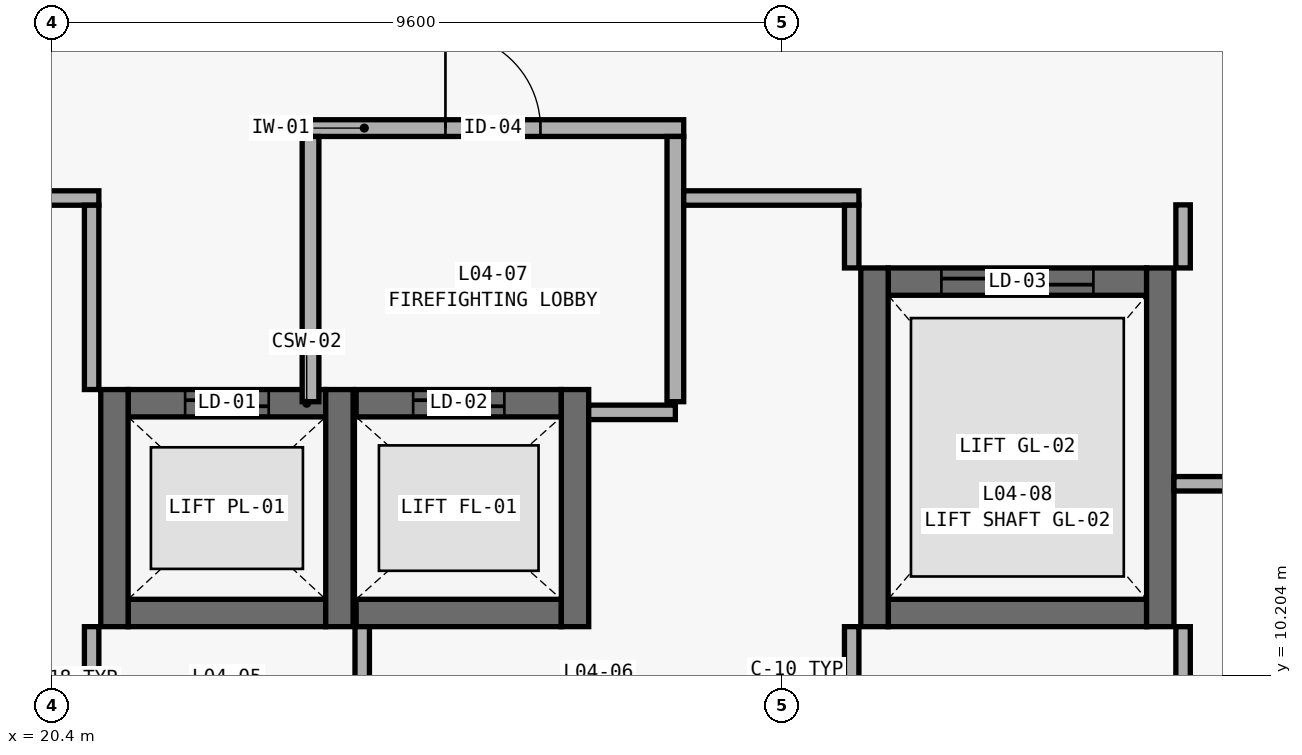
"""IFC4 building model, lengths in metres.
Left out: names, types, materials, properties, quantities, classifications, styles, units other than length and angle.
Written with IfcOpenShell. Run it as: python <this file> out.ifc"""

import sys

from ifc_helpers import new_model, si_unit, direction, frame, frame_2d, origin, place, context, subcontext, project, spatial, rectangle, extrude, element, fill, save


model = new_model("IFC4")
c1 = context("Model", 3, precision=1e-05, world=origin(), true_north=direction((0.0, 1.0)))
c2 = subcontext(c1, "Body", "Model", "MODEL_VIEW")
j1 = project(units=[si_unit("LENGTHUNIT", "METRE"), si_unit("PLANEANGLEUNIT", "RADIAN")], contexts=[c1])
p1 = place(None, origin())
s1 = spatial("IfcSite", under=j1, at=p1, CompositionType="ELEMENT")
p2 = place(p1, origin())
s2 = spatial("IfcBuilding", under=s1, at=p2, CompositionType="ELEMENT")
p3 = place(p2, frame((0.0, 0.0, 21.3)))
s3 = spatial("IfcBuildingStorey", under=s2, at=p3, CompositionType="ELEMENT", Elevation=21.3)
p4 = place(p3, frame((21.4, 13.78, 0.0), z_axis=(0.0, 0.0, 1.0), x_axis=(1.0, 0.0, 0.0)))
e1 = element("IfcWall", 1, at=p4, inside=s3, PredefinedType="SHEAR", context=c2, shape_type="SweptSolid", body=[
    extrude(rectangle(XDim=2.6, YDim=0.36, at=frame_2d((1.3, 0.0))), origin(), (0.0, 0.0, 1.0), 3.95),
])
p5 = place(p4, frame((0.75, 0.0, 0.0)))
e2 = element("IfcOpeningElement", 2, at=p5, cuts=e1, PredefinedType="OPENING", context=c2, shape_type="SweptSolid", body=[
    extrude(rectangle(XDim=1.1, YDim=2.15, at=frame_2d((0.55, 1.075))), frame((0.0, 0.195, 0.0), z_axis=(0.0, -1.0, 0.0), x_axis=(1.0, 0.0, 0.0)), (0.0, 0.0, 1.0), 0.39),
])
p6 = place(p3, frame((21.4, 11.02, 0.0), z_axis=(0.0, 0.0, 1.0), x_axis=(1.0, 0.0, 0.0)))
e3 = element("IfcWall", 3, at=p6, inside=s3, PredefinedType="SHEAR", context=c2, shape_type="SweptSolid", body=[
    extrude(rectangle(XDim=2.6, YDim=0.36, at=frame_2d((1.3, 0.0))), origin(), (0.0, 0.0, 1.0), 3.95),
])
for number, where, z_axis, x_axis in (
    (4, (21.22, 10.84, 0.0), (0.0, 0.0, 1.0), (0.0, 1.0, 0.0)),
    (5, (24.18, 10.84, 0.0), (0.0, 0.0, 1.0), (0.0, 1.0, 0.0)),
):
    element("IfcWall", number, at=place(p3, frame(where, z_axis=z_axis, x_axis=x_axis)), inside=s3, PredefinedType="SHEAR", context=c2, shape_type="SweptSolid", body=[
        extrude(rectangle(XDim=3.12, YDim=0.36, at=frame_2d((1.56, 0.0))), origin(), (0.0, 0.0, 1.0), 3.95),
    ])
p7 = place(p3, frame((24.4, 13.78, 0.0), z_axis=(0.0, 0.0, 1.0), x_axis=(1.0, 0.0, 0.0)))
e6 = element("IfcWall", 6, at=p7, inside=s3, PredefinedType="SHEAR", context=c2, shape_type="SweptSolid", body=[
    extrude(rectangle(XDim=2.7, YDim=0.36, at=frame_2d((1.35, 0.0))), origin(), (0.0, 0.0, 1.0), 3.95),
])
p8 = place(p7, frame((0.75, 0.0, 0.0)))
e7 = element("IfcOpeningElement", 7, at=p8, cuts=e6, PredefinedType="OPENING", context=c2, shape_type="SweptSolid", body=[
    extrude(rectangle(XDim=1.2, YDim=2.15, at=frame_2d((0.6, 1.075))), frame((0.0, 0.195, 0.0), z_axis=(0.0, -1.0, 0.0), x_axis=(1.0, 0.0, 0.0)), (0.0, 0.0, 1.0), 0.39),
])
p9 = place(p3, frame((24.4, 11.02, 0.0), z_axis=(0.0, 0.0, 1.0), x_axis=(1.0, 0.0, 0.0)))
e8 = element("IfcWall", 8, at=p9, inside=s3, PredefinedType="SHEAR", context=c2, shape_type="SweptSolid", body=[
    extrude(rectangle(XDim=2.7, YDim=0.36, at=frame_2d((1.35, 0.0))), origin(), (0.0, 0.0, 1.0), 3.95),
])
p10 = place(p3, frame((27.28, 10.84, 0.0), z_axis=(0.0, 0.0, 1.0), x_axis=(0.0, 1.0, 0.0)))
e9 = element("IfcWall", 9, at=p10, inside=s3, PredefinedType="SHEAR", context=c2, shape_type="SweptSolid", body=[
    extrude(rectangle(XDim=3.12, YDim=0.36, at=frame_2d((1.56, 0.0))), origin(), (0.0, 0.0, 1.0), 3.95),
])
p11 = place(p3, frame((23.69, 17.4, 0.0), z_axis=(0.0, 0.0, 1.0), x_axis=(1.0, 0.0, 0.0)))
e10 = element("IfcWall", 10, at=p11, inside=s3, PredefinedType="PARTITIONING", context=c2, shape_type="SweptSolid", body=[
    extrude(rectangle(XDim=5.02, YDim=0.22, at=frame_2d((2.51, 0.0))), origin(), (0.0, 0.0, 1.0), 2.83),
])
p12 = place(p11, frame((1.885, 0.0, 0.0)))
e11 = element("IfcOpeningElement", 11, at=p12, cuts=e10, PredefinedType="OPENING", context=c2, shape_type="SweptSolid", body=[
    extrude(rectangle(XDim=1.25, YDim=2.15, at=frame_2d((0.625, 1.075))), frame((0.0, 0.125, 0.0), z_axis=(0.0, -1.0, 0.0), x_axis=(1.0, 0.0, 0.0)), (0.0, 0.0, 1.0), 0.25),
])
for number, where, z_axis, x_axis in (
    (12, (23.8, 13.8, 0.0), (0.0, 0.0, 1.0), (0.0, 1.0, 0.0)),
    (13, (28.6, 13.8, 0.0), (0.0, 0.0, 1.0), (0.0, 1.0, 0.0)),
):
    element("IfcWall", number, at=place(p3, frame(where, z_axis=z_axis, x_axis=x_axis)), inside=s3, PredefinedType="PARTITIONING", context=c2, shape_type="SweptSolid", body=[
        extrude(rectangle(XDim=3.49, YDim=0.22, at=frame_2d((1.745, 0.0))), origin(), (0.0, 0.0, 1.0), 2.83),
    ])
p13 = place(p3, frame((31.4, 15.38, 0.0), z_axis=(0.0, 0.0, 1.0), x_axis=(1.0, 0.0, 0.0)))
e14 = element("IfcWall", 14, at=p13, inside=s3, PredefinedType="SHEAR", context=c2, shape_type="SweptSolid", body=[
    extrude(rectangle(XDim=3.4, YDim=0.36, at=frame_2d((1.7, 0.0))), origin(), (0.0, 0.0, 1.0), 3.95),
])
p14 = place(p13, frame((0.7, 0.0, 0.0)))
e15 = element("IfcOpeningElement", 15, at=p14, cuts=e14, PredefinedType="OPENING", context=c2, shape_type="SweptSolid", body=[
    extrude(rectangle(XDim=2.0, YDim=2.4, at=frame_2d((1.0, 1.2))), frame((0.0, 0.195, 0.0), z_axis=(0.0, -1.0, 0.0), x_axis=(1.0, 0.0, 0.0)), (0.0, 0.0, 1.0), 0.39),
])
p15 = place(p3, frame((31.4, 11.02, 0.0), z_axis=(0.0, 0.0, 1.0), x_axis=(1.0, 0.0, 0.0)))
e16 = element("IfcWall", 16, at=p15, inside=s3, PredefinedType="SHEAR", context=c2, shape_type="SweptSolid", body=[
    extrude(rectangle(XDim=3.4, YDim=0.36, at=frame_2d((1.7, 0.0))), origin(), (0.0, 0.0, 1.0), 3.95),
])
for number, where, z_axis, x_axis in (
    (17, (31.22, 10.84, 0.0), (0.0, 0.0, 1.0), (0.0, 1.0, 0.0)),
    (18, (34.98, 10.84, 0.0), (0.0, 0.0, 1.0), (0.0, 1.0, 0.0)),
):
    element("IfcWall", number, at=place(p3, frame(where, z_axis=z_axis, x_axis=x_axis)), inside=s3, PredefinedType="SHEAR", context=c2, shape_type="SweptSolid", body=[
        extrude(rectangle(XDim=4.72, YDim=0.36, at=frame_2d((2.36, 0.0))), origin(), (0.0, 0.0, 1.0), 3.95),
    ])
p16 = place(p3, frame((35.16, 12.72, 0.0), z_axis=(0.0, 0.0, 1.0), x_axis=(1.0, 0.0, 0.0)))
e19 = element("IfcWall", 19, at=p16, inside=s3, PredefinedType="PARTITIONING", context=c2, shape_type="SweptSolid", body=[
    extrude(rectangle(XDim=4.145, YDim=0.19, at=frame_2d((2.073, 0.0))), origin(), (0.0, 0.0, 1.0), 2.83),
])
p17 = place(p3, frame((27.46, 13.66, 0.0), z_axis=(0.0, 0.0, 1.0), x_axis=(1.0, 0.0, 0.0)))
e20 = element("IfcWall", 20, at=p17, inside=s3, PredefinedType="PARTITIONING", context=c2, shape_type="SweptSolid", body=[
    extrude(rectangle(XDim=1.14, YDim=0.19, at=frame_2d((0.57, 0.0))), origin(), (0.0, 0.0, 1.0), 2.83),
])
p18 = place(p3, frame((19.685, 16.48, 0.0), z_axis=(0.0, 0.0, 1.0), x_axis=(1.0, 0.0, 0.0)))
e21 = element("IfcWall", 21, at=p18, inside=s3, PredefinedType="PARTITIONING", context=c2, shape_type="SweptSolid", body=[
    extrude(rectangle(XDim=1.33, YDim=0.19, at=frame_2d((0.665, 0.0))), origin(), (0.0, 0.0, 1.0), 2.83),
])
p19 = place(p3, frame((28.71, 16.48, 0.0), z_axis=(0.0, 0.0, 1.0), x_axis=(1.0, 0.0, 0.0)))
e22 = element("IfcWall", 22, at=p19, inside=s3, PredefinedType="PARTITIONING", context=c2, shape_type="SweptSolid", body=[
    extrude(rectangle(XDim=2.305, YDim=0.19, at=frame_2d((1.152, 0.0))), origin(), (0.0, 0.0, 1.0), 2.83),
])
p20 = place(p3, frame((20.92, 9.015, 0.0), z_axis=(0.0, 0.0, 1.0), x_axis=(0.0, 1.0, 0.0)))
e23 = element("IfcWall", 23, at=p20, inside=s3, PredefinedType="PARTITIONING", context=c2, shape_type="SweptSolid", body=[
    extrude(rectangle(XDim=1.825, YDim=0.19, at=frame_2d((0.913, 0.0))), origin(), (0.0, 0.0, 1.0), 2.83),
])
p21 = place(p3, frame((20.92, 13.96, 0.0), z_axis=(0.0, 0.0, 1.0), x_axis=(0.0, 1.0, 0.0)))
e24 = element("IfcWall", 24, at=p21, inside=s3, PredefinedType="PARTITIONING", context=c2, shape_type="SweptSolid", body=[
    extrude(rectangle(XDim=2.425, YDim=0.19, at=frame_2d((1.212, 0.0))), origin(), (0.0, 0.0, 1.0), 2.83),
])
for number, where, z_axis, x_axis in (
    (25, (24.48, 9.015, 0.0), (0.0, 0.0, 1.0), (0.0, 1.0, 0.0)),
    (26, (30.92, 9.015, 0.0), (0.0, 0.0, 1.0), (0.0, 1.0, 0.0)),
):
    element("IfcWall", number, at=place(p3, frame(where, z_axis=z_axis, x_axis=x_axis)), inside=s3, PredefinedType="PARTITIONING", context=c2, shape_type="SweptSolid", body=[
        extrude(rectangle(XDim=1.825, YDim=0.19, at=frame_2d((0.913, 0.0))), origin(), (0.0, 0.0, 1.0), 2.83),
    ])
p22 = place(p3, frame((30.92, 15.56, 0.0), z_axis=(0.0, 0.0, 1.0), x_axis=(0.0, 1.0, 0.0)))
e27 = element("IfcWall", 27, at=p22, inside=s3, PredefinedType="PARTITIONING", context=c2, shape_type="SweptSolid", body=[
    extrude(rectangle(XDim=0.825, YDim=0.19, at=frame_2d((0.413, 0.0))), origin(), (0.0, 0.0, 1.0), 2.83),
])
p23 = place(p3, frame((35.28, 9.015, 0.0), z_axis=(0.0, 0.0, 1.0), x_axis=(0.0, 1.0, 0.0)))
e28 = element("IfcWall", 28, at=p23, inside=s3, PredefinedType="PARTITIONING", context=c2, shape_type="SweptSolid", body=[
    extrude(rectangle(XDim=1.825, YDim=0.19, at=frame_2d((0.913, 0.0))), origin(), (0.0, 0.0, 1.0), 2.83),
])
p24 = place(p3, frame((35.28, 15.56, 0.0), z_axis=(0.0, 0.0, 1.0), x_axis=(0.0, 1.0, 0.0)))
e29 = element("IfcWall", 29, at=p24, inside=s3, PredefinedType="PARTITIONING", context=c2, shape_type="SweptSolid", body=[
    extrude(rectangle(XDim=0.83, YDim=0.19, at=frame_2d((0.415, 0.0))), origin(), (0.0, 0.0, 1.0), 2.83),
])
p25 = place(p5, origin())
e30 = element("IfcDoor", 30, at=p25, inside=s3, OperationType="DOUBLE_DOOR_SLIDING", PredefinedType="DOOR", context=c2, shape_type="SweptSolid", body=[
    extrude(rectangle(XDim=1.1, YDim=2.15, at=frame_2d((0.55, 1.075))), frame((0.0, 0.025, 0.0), z_axis=(0.0, -1.0, 0.0), x_axis=(1.0, 0.0, 0.0)), (0.0, 0.0, 1.0), 0.05),
])
fill(e2, e30)
p26 = place(p8, origin())
e31 = element("IfcDoor", 31, at=p26, inside=s3, OperationType="DOUBLE_DOOR_SLIDING", PredefinedType="DOOR", context=c2, shape_type="SweptSolid", body=[
    extrude(rectangle(XDim=1.2, YDim=2.15, at=frame_2d((0.6, 1.075))), frame((0.0, 0.025, 0.0), z_axis=(0.0, -1.0, 0.0), x_axis=(1.0, 0.0, 0.0)), (0.0, 0.0, 1.0), 0.05),
])
fill(e7, e31)
p27 = place(p12, origin())
e32 = element("IfcDoor", 32, at=p27, inside=s3, OperationType="SINGLE_SWING_LEFT", PredefinedType="DOOR", context=c2, shape_type="SweptSolid", body=[
    extrude(rectangle(XDim=1.25, YDim=2.15, at=frame_2d((0.625, 1.075))), frame((0.0, 0.025, 0.0), z_axis=(0.0, -1.0, 0.0), x_axis=(1.0, 0.0, 0.0)), (0.0, 0.0, 1.0), 0.05),
])
fill(e11, e32)
p28 = place(p14, origin())
e33 = element("IfcDoor", 33, at=p28, inside=s3, OperationType="DOUBLE_DOOR_SLIDING", PredefinedType="DOOR", context=c2, shape_type="SweptSolid", body=[
    extrude(rectangle(XDim=2.0, YDim=2.4, at=frame_2d((1.0, 1.2))), frame((0.0, 0.025, 0.0), z_axis=(0.0, -1.0, 0.0), x_axis=(1.0, 0.0, 0.0)), (0.0, 0.0, 1.0), 0.05),
])
fill(e15, e33)
save(model, sys.argv[1])
